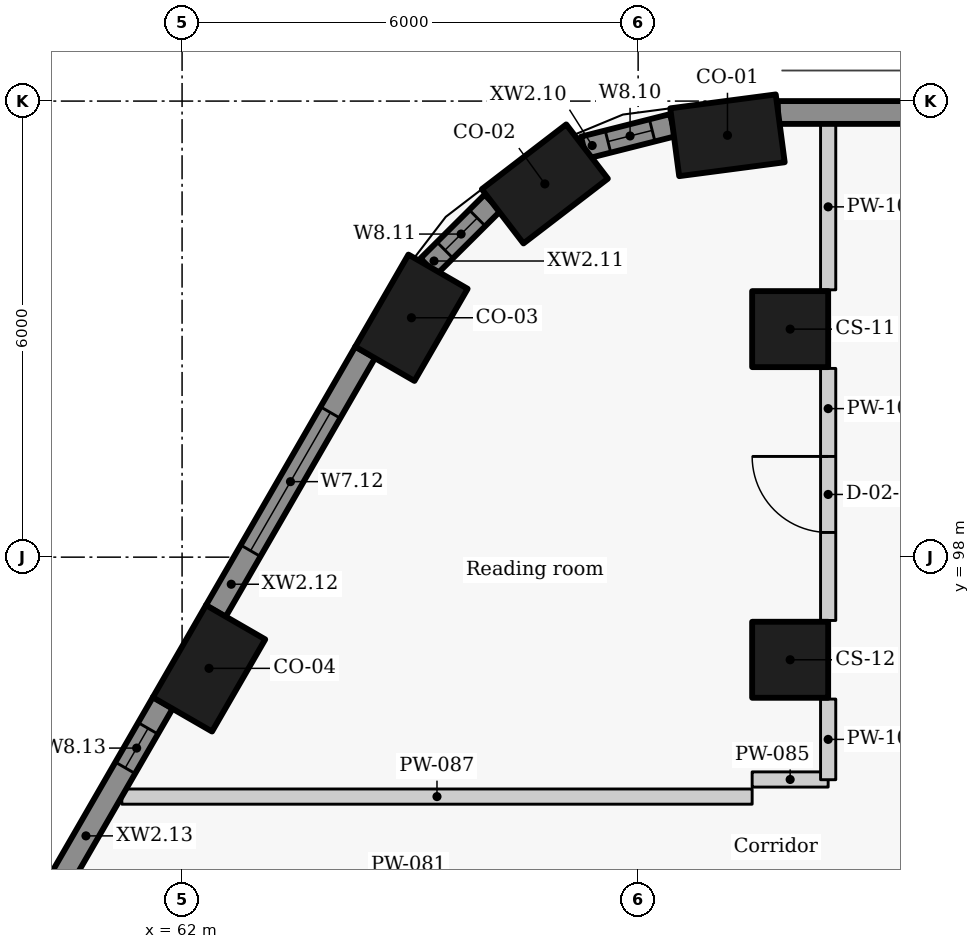
"""IFC4 building model, lengths in metres.
Left out: names, types, materials, properties, quantities, classifications, styles, units other than length and angle.
Written with IfcOpenShell. Run it as: python <this file> out.ifc"""

import sys

from ifc_helpers import new_model, si_unit, direction, frame, frame_2d, origin, origin_2d, place, context, subcontext, project, spatial, rectangle, extrude, element, fill, save


model = new_model("IFC4")
c1 = context("Model", 3, precision=1e-05, world=origin(), true_north=direction((0.0, 1.0)))
c2 = subcontext(c1, "Body", "Model", "MODEL_VIEW")
j1 = project(units=[si_unit("LENGTHUNIT", "METRE"), si_unit("PLANEANGLEUNIT", "RADIAN")], contexts=[c1])
p1 = place(None, origin())
s1 = spatial("IfcSite", under=j1, at=p1, CompositionType="ELEMENT")
p2 = place(p1, origin())
s2 = spatial("IfcBuilding", under=s1, at=p2, CompositionType="ELEMENT")
p3 = place(p2, frame((0.0, 0.0, 77.7)))
s3 = spatial("IfcBuildingStorey", under=s2, at=p3, CompositionType="ELEMENT", Elevation=77.7)
for number, where, z_axis, x_axis in (
    (1, (69.175, 103.55, 0.0), (0.0, 0.0, 1.0), (-0.991, -0.131, 0.0)),
    (2, (66.773, 102.91, 0.0), (0.0, 0.0, 1.0), (-0.793, -0.609, 0.0)),
    (3, (65.018, 101.149, 0.0), (0.0, 0.0, 1.0), (-0.5, -0.866, 0.0)),
    (4, (62.354, 96.537, 0.0), (0.0, 0.0, 1.0), (-0.5, -0.866, 0.0)),
):
    element("IfcColumn", number, at=place(p3, frame(where, z_axis=z_axis, x_axis=x_axis)), inside=s3, PredefinedType="COLUMN", context=c2, shape_type="SweptSolid", body=[
        extrude(rectangle(XDim=1.4, YDim=0.9, at=origin_2d()), origin(), (0.0, 0.0, 1.0), 3.3),
    ])
for number, where, z_axis, x_axis in (
    (5, (70.0, 101.0, 0.0), (0.0, 0.0, 1.0), (0.0, -1.0, 0.0)),
    (6, (70.0, 96.65, 0.0), (0.0, 0.0, 1.0), (0.0, -1.0, 0.0)),
):
    element("IfcColumn", number, at=place(p3, frame(where, z_axis=z_axis, x_axis=x_axis)), inside=s3, PredefinedType="COLUMN", context=c2, shape_type="SweptSolid", body=[
        extrude(rectangle(XDim=1.0, YDim=1.0, at=origin_2d()), origin(), (0.0, 0.0, 1.0), 3.3),
    ])
p4 = place(p3, frame((90.129, 103.85, 0.0), z_axis=(0.0, 0.0, 1.0), x_axis=(-1.0, 0.0, 0.0)))
e7 = element("IfcWall", 7, at=p4, inside=s3, PredefinedType="SOLIDWALL", context=c2, shape_type="SweptSolid", body=[
    extrude(rectangle(XDim=20.291, YDim=0.3, at=frame_2d((10.146, 0.0))), origin(), (0.0, 0.0, 1.0), 2.425),
])
p5 = place(p3, frame((68.456, 103.683, 0.0), z_axis=(0.0, 0.0, 1.0), x_axis=(-0.969485113966, -0.245150186208, 0.0)))
e8 = element("IfcWall", 8, at=p5, inside=s3, PredefinedType="SOLIDWALL", context=c2, shape_type="SweptSolid", body=[
    extrude(rectangle(XDim=1.208, YDim=0.3, at=frame_2d((0.604, 0.0))), origin(), (0.0, 0.0, 1.0), 2.425),
])
p6 = place(p5, frame((0.28, 0.0, 0.9)))
e9 = element("IfcOpeningElement", 9, at=p6, cuts=e8, PredefinedType="OPENING", context=c2, shape_type="SweptSolid", body=[
    extrude(rectangle(XDim=0.6, YDim=1.1, at=frame_2d((0.3, 0.55))), frame((0.0, 0.16, 0.0), z_axis=(0.0, -1.0, 0.0), x_axis=(1.0, 0.0, 0.0)), (0.0, 0.0, 1.0), 0.32),
])
p7 = place(p3, frame((66.085, 102.663, 0.0), z_axis=(0.0, 0.0, 1.0), x_axis=(-0.708951665509, -0.705257070842, 0.0)))
e10 = element("IfcWall", 10, at=p7, inside=s3, PredefinedType="SOLIDWALL", context=c2, shape_type="SweptSolid", body=[
    extrude(rectangle(XDim=1.189, YDim=0.3, at=frame_2d((0.595, 0.0))), origin(), (0.0, 0.0, 1.0), 2.425),
])
p8 = place(p7, frame((0.284, 0.0, 0.9)))
e11 = element("IfcOpeningElement", 11, at=p8, cuts=e10, PredefinedType="OPENING", context=c2, shape_type="SweptSolid", body=[
    extrude(rectangle(XDim=0.6, YDim=1.1, at=frame_2d((0.3, 0.55))), frame((0.0, 0.16, 0.0), z_axis=(0.0, -1.0, 0.0), x_axis=(1.0, 0.0, 0.0)), (0.0, 0.0, 1.0), 0.32),
])
p9 = place(p3, frame((64.41, 100.697, 0.0), z_axis=(0.0, 0.0, 1.0), x_axis=(-0.500003583557, -0.866023334807, 0.0)))
e12 = element("IfcWall", 12, at=p9, inside=s3, PredefinedType="SOLIDWALL", context=c2, shape_type="SweptSolid", body=[
    extrude(rectangle(XDim=3.934, YDim=0.3, at=frame_2d((1.967, 0.0))), origin(), (0.0, 0.0, 1.0), 2.425),
])
p10 = place(p9, frame((0.917, 0.0, 0.9)))
e13 = element("IfcOpeningElement", 13, at=p10, cuts=e12, PredefinedType="OPENING", context=c2, shape_type="SweptSolid", body=[
    extrude(rectangle(XDim=2.1, YDim=1.1, at=frame_2d((1.05, 0.55))), frame((0.0, 0.16, 0.0), z_axis=(0.0, -1.0, 0.0), x_axis=(1.0, 0.0, 0.0)), (0.0, 0.0, 1.0), 0.32),
])
p11 = place(p3, frame((61.747, 96.084, 0.0), z_axis=(0.0, 0.0, 1.0), x_axis=(-0.499957037901, -0.866050206543, 0.0)))
e14 = element("IfcWall", 14, at=p11, inside=s3, PredefinedType="SOLIDWALL", context=c2, shape_type="SweptSolid", body=[
    extrude(rectangle(XDim=3.934, YDim=0.3, at=frame_2d((1.967, 0.0))), origin(), (0.0, 0.0, 1.0), 2.425),
])
p12 = place(p11, frame((0.389, 0.0, 0.9)))
e15 = element("IfcOpeningElement", 15, at=p12, cuts=e14, PredefinedType="OPENING", context=c2, shape_type="SweptSolid", body=[
    extrude(rectangle(XDim=0.6, YDim=1.1, at=frame_2d((0.3, 0.55))), frame((0.0, 0.16, 0.0), z_axis=(0.0, -1.0, 0.0), x_axis=(1.0, 0.0, 0.0)), (0.0, 0.0, 1.0), 0.32),
])
p13 = place(p11, frame((3.056, 0.0, 0.9)))
e16 = element("IfcOpeningElement", 16, at=p13, cuts=e14, PredefinedType="OPENING", context=c2, shape_type="SweptSolid", body=[
    extrude(rectangle(XDim=0.6, YDim=1.1, at=frame_2d((0.3, 0.55))), frame((0.0, 0.16, 0.0), z_axis=(0.0, -1.0, 0.0), x_axis=(1.0, 0.0, 0.0)), (0.0, 0.0, 1.0), 0.32),
])
p14 = place(p3, frame((69.5, 95.075, 0.0), z_axis=(0.0, 0.0, 1.0), x_axis=(1.0, 0.0, 0.0)))
e17 = element("IfcWall", 17, at=p14, inside=s3, PredefinedType="PARTITIONING", context=c2, shape_type="SweptSolid", body=[
    extrude(rectangle(XDim=1.0, YDim=0.2, at=frame_2d((0.5, 0.0))), origin(), (0.0, 0.0, 1.0), 2.505),
])
p15 = place(p3, frame((61.207, 94.85, 0.0), z_axis=(0.0, 0.0, 1.0), x_axis=(1.0, 0.0, 0.0)))
e18 = element("IfcWall", 18, at=p15, inside=s3, PredefinedType="PARTITIONING", context=c2, shape_type="SweptSolid", body=[
    extrude(rectangle(XDim=8.293, YDim=0.2, at=frame_2d((4.146, 0.0))), origin(), (0.0, 0.0, 1.0), 2.405),
])
p16 = place(p3, frame((70.5, 95.072, 0.0), z_axis=(0.0, 0.0, 1.0), x_axis=(0.0, 1.0, 0.0)))
e19 = element("IfcWall", 19, at=p16, inside=s3, PredefinedType="PARTITIONING", context=c2, shape_type="SweptSolid", body=[
    extrude(rectangle(XDim=1.061, YDim=0.2, at=frame_2d((0.531, 0.0))), origin(), (0.0, 0.0, 1.0), 3.025),
])
p17 = place(p3, frame((70.5, 97.167, 0.0), z_axis=(0.0, 0.0, 1.0), x_axis=(0.0, 1.0, 0.0)))
e20 = element("IfcWall", 20, at=p17, inside=s3, PredefinedType="PARTITIONING", context=c2, shape_type="SweptSolid", body=[
    extrude(rectangle(XDim=3.316, YDim=0.2, at=frame_2d((1.658, 0.0))), origin(), (0.0, 0.0, 1.0), 3.025),
])
p18 = place(p17, frame((1.158, 0.0, 0.0)))
e21 = element("IfcOpeningElement", 21, at=p18, cuts=e20, PredefinedType="OPENING", context=c2, shape_type="SweptSolid", body=[
    extrude(rectangle(XDim=1.0, YDim=2.1, at=frame_2d((0.5, 1.05))), frame((0.0, 0.11, 0.0), z_axis=(0.0, -1.0, 0.0), x_axis=(1.0, 0.0, 0.0)), (0.0, 0.0, 1.0), 0.22),
])
p19 = place(p3, frame((70.5, 101.517, 0.0), z_axis=(0.0, 0.0, 1.0), x_axis=(0.0, 1.0, 0.0)))
e22 = element("IfcWall", 22, at=p19, inside=s3, PredefinedType="PARTITIONING", context=c2, shape_type="SweptSolid", body=[
    extrude(rectangle(XDim=2.183, YDim=0.2, at=frame_2d((1.091, 0.0))), origin(), (0.0, 0.0, 1.0), 3.025),
])
p20 = place(p6, origin())
e23 = element("IfcWindow", 23, at=p20, inside=s3, PartitioningType="SINGLE_PANEL", PredefinedType="WINDOW", context=c2, shape_type="SweptSolid", body=[
    extrude(rectangle(XDim=0.6, YDim=1.1, at=frame_2d((0.3, 0.55))), frame((0.0, 0.03, 0.0), z_axis=(0.0, -1.0, 0.0), x_axis=(1.0, 0.0, 0.0)), (0.0, 0.0, 1.0), 0.06),
])
fill(e9, e23)
p21 = place(p8, origin())
e24 = element("IfcWindow", 24, at=p21, inside=s3, PartitioningType="SINGLE_PANEL", PredefinedType="WINDOW", context=c2, shape_type="SweptSolid", body=[
    extrude(rectangle(XDim=0.6, YDim=1.1, at=frame_2d((0.3, 0.55))), frame((0.0, 0.03, 0.0), z_axis=(0.0, -1.0, 0.0), x_axis=(1.0, 0.0, 0.0)), (0.0, 0.0, 1.0), 0.06),
])
fill(e11, e24)
p22 = place(p10, origin())
e25 = element("IfcWindow", 25, at=p22, inside=s3, PartitioningType="SINGLE_PANEL", PredefinedType="WINDOW", context=c2, shape_type="SweptSolid", body=[
    extrude(rectangle(XDim=2.1, YDim=1.1, at=frame_2d((1.05, 0.55))), frame((0.0, 0.03, 0.0), z_axis=(0.0, -1.0, 0.0), x_axis=(1.0, 0.0, 0.0)), (0.0, 0.0, 1.0), 0.06),
])
fill(e13, e25)
p23 = place(p12, origin())
e26 = element("IfcWindow", 26, at=p23, inside=s3, PartitioningType="SINGLE_PANEL", PredefinedType="WINDOW", context=c2, shape_type="SweptSolid", body=[
    extrude(rectangle(XDim=0.6, YDim=1.1, at=frame_2d((0.3, 0.55))), frame((0.0, 0.03, 0.0), z_axis=(0.0, -1.0, 0.0), x_axis=(1.0, 0.0, 0.0)), (0.0, 0.0, 1.0), 0.06),
])
fill(e15, e26)
p24 = place(p18, origin())
e27 = element("IfcDoor", 27, at=p24, inside=s3, OperationType="SINGLE_SWING_RIGHT", PredefinedType="DOOR", context=c2, shape_type="SweptSolid", body=[
    extrude(rectangle(XDim=1.0, YDim=2.1, at=frame_2d((0.5, 1.05))), frame((0.0, 0.025, 0.0), z_axis=(0.0, -1.0, 0.0), x_axis=(1.0, 0.0, 0.0)), (0.0, 0.0, 1.0), 0.05),
])
fill(e21, e27)
save(model, sys.argv[1])
